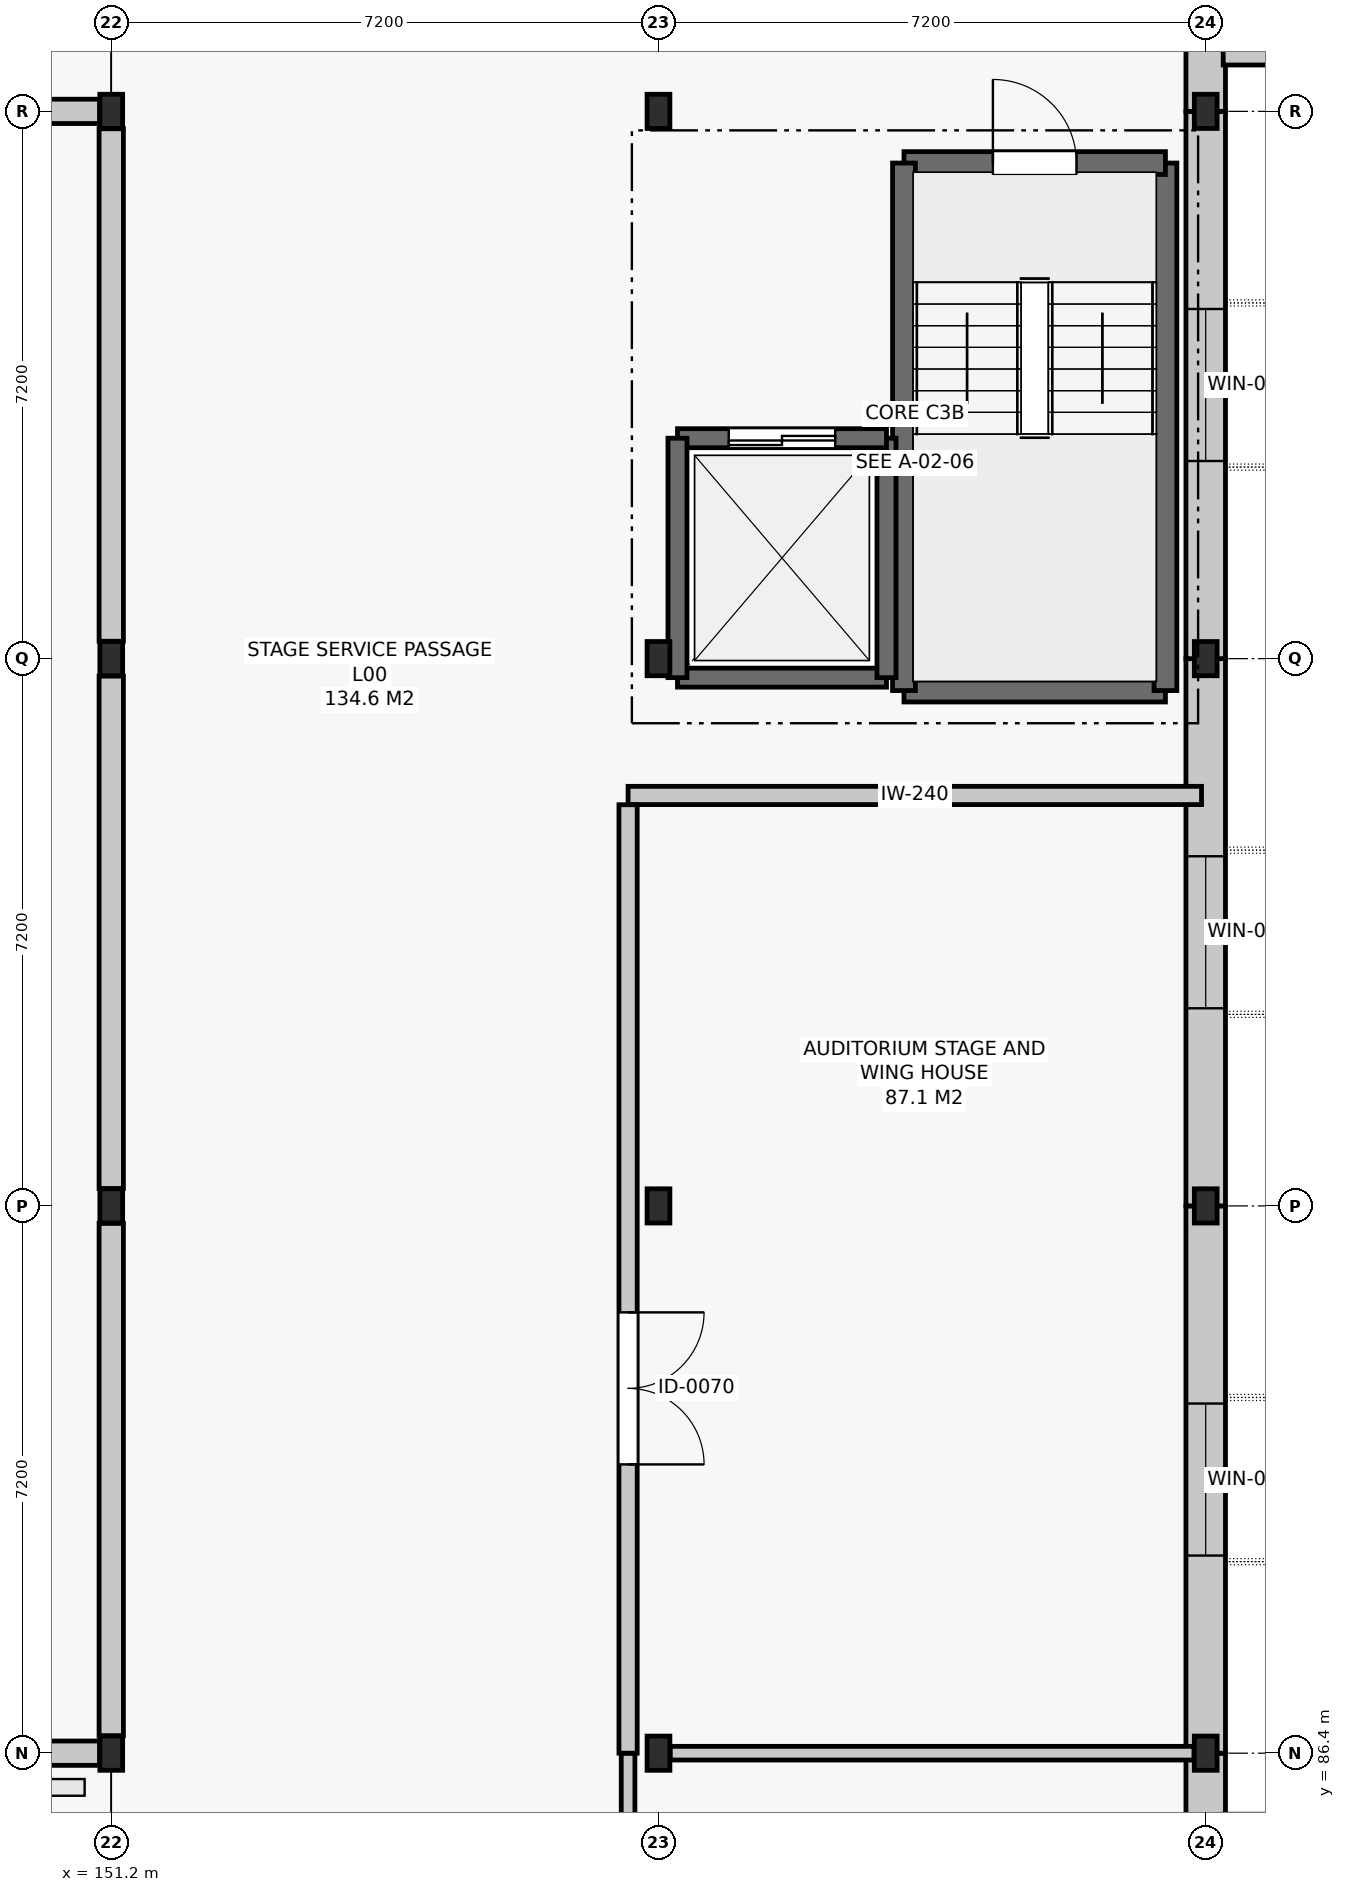
"""IFC4 building model, lengths in metres.
Left out: names, types, materials, properties, quantities, classifications, styles, units other than length and angle.
Written with IfcOpenShell. Run it as: python <this file> out.ifc"""

import sys

from ifc_helpers import new_model, si_unit, direction, frame, frame_2d, origin, origin_2d, place, context, subcontext, project, spatial, rectangle, i_section, extrude, element, fill, save


model = new_model("IFC4")
c1 = context("Model", 3, precision=1e-05, world=origin(), true_north=direction((0.0, 1.0)))
c2 = subcontext(c1, "Body", "Model", "MODEL_VIEW")
j1 = project(units=[si_unit("LENGTHUNIT", "METRE"), si_unit("PLANEANGLEUNIT", "RADIAN")], contexts=[c1])
p1 = place(None, origin())
s1 = spatial("IfcSite", under=j1, at=p1, CompositionType="ELEMENT")
p2 = place(p1, origin())
s2 = spatial("IfcBuilding", under=s1, at=p2, CompositionType="ELEMENT")
p3 = place(p2, origin())
s3 = spatial("IfcBuildingStorey", under=s2, at=p3, CompositionType="ELEMENT", Elevation=0.0)
for number, where, z_axis, x_axis in (
    (1, (151.2, 86.4, 0.0), (0.0, 0.0, 1.0), (1.0, 0.0, 0.0)),
    (2, (151.2, 93.6, 0.0), (0.0, 0.0, 1.0), (1.0, 0.0, 0.0)),
    (3, (151.2, 100.8, 0.0), (0.0, 0.0, 1.0), (1.0, 0.0, 0.0)),
    (4, (151.2, 108.0, 0.0), (0.0, 0.0, 1.0), (1.0, 0.0, 0.0)),
    (5, (158.4, 86.4, 0.0), (0.0, 0.0, 1.0), (1.0, 0.0, 0.0)),
    (6, (158.4, 93.6, 0.0), (0.0, 0.0, 1.0), (1.0, 0.0, 0.0)),
    (7, (158.4, 100.8, 0.0), (0.0, 0.0, 1.0), (1.0, 0.0, 0.0)),
    (8, (158.4, 108.0, 0.0), (0.0, 0.0, 1.0), (1.0, 0.0, 0.0)),
    (9, (165.6, 86.4, 0.0), (0.0, 0.0, 1.0), (1.0, 0.0, 0.0)),
    (10, (165.6, 93.6, 0.0), (0.0, 0.0, 1.0), (1.0, 0.0, 0.0)),
    (11, (165.6, 100.8, 0.0), (0.0, 0.0, 1.0), (1.0, 0.0, 0.0)),
    (12, (165.6, 108.0, 0.0), (0.0, 0.0, 1.0), (1.0, 0.0, 0.0)),
):
    element("IfcColumn", number, at=place(p3, frame(where, z_axis=z_axis, x_axis=x_axis)), inside=s3, PredefinedType="COLUMN", context=c2, shape_type="SweptSolid", body=[
        extrude(i_section(OverallWidth=0.3, OverallDepth=0.45, WebThickness=0.014, FlangeThickness=0.026, FilletRadius=0.027, at=origin_2d()), origin(), (0.0, 0.0, 1.0), 5.4),
    ])
p4 = place(p3, frame((165.6, 79.429, 0.0), z_axis=(0.0, 0.0, 1.0), x_axis=(0.0, 1.0, 0.0)))
e13 = element("IfcWall", 13, at=p4, inside=s3, PredefinedType="SOLIDWALL", context=c2, shape_type="SweptSolid", body=[
    extrude(rectangle(XDim=6.971, YDim=0.52, at=frame_2d((3.485, 0.0))), origin(), (0.0, 0.0, 1.0), 4.4),
])
p5 = place(p4, frame((1.885, 0.0, 0.0)))
e14 = element("IfcOpeningElement", 14, at=p5, cuts=e13, PredefinedType="OPENING", context=c2, shape_type="SweptSolid", body=[
    extrude(rectangle(XDim=3.2, YDim=3.4, at=frame_2d((1.6, 1.7))), frame((0.0, 0.272, 0.0), z_axis=(0.0, -1.0, 0.0), x_axis=(1.0, 0.0, 0.0)), (0.0, 0.0, 1.0), 0.544),
])
p6 = place(p3, frame((165.6, 86.4, 0.0), z_axis=(0.0, 0.0, 1.0), x_axis=(0.0, 1.0, 0.0)))
e15 = element("IfcWall", 15, at=p6, inside=s3, PredefinedType="SOLIDWALL", context=c2, shape_type="SweptSolid", body=[
    extrude(rectangle(XDim=7.2, YDim=0.52, at=frame_2d((3.6, 0.0))), origin(), (0.0, 0.0, 1.0), 4.4),
])
p7 = place(p6, frame((2.6, 0.0, 1.35)))
e16 = element("IfcOpeningElement", 16, at=p7, cuts=e15, PredefinedType="OPENING", context=c2, shape_type="SweptSolid", body=[
    extrude(rectangle(XDim=2.0, YDim=1.5, at=frame_2d((1.0, 0.75))), frame((0.0, 0.272, 0.0), z_axis=(0.0, -1.0, 0.0), x_axis=(1.0, 0.0, 0.0)), (0.0, 0.0, 1.0), 0.544),
])
p8 = place(p3, frame((165.6, 93.6, 0.0), z_axis=(0.0, 0.0, 1.0), x_axis=(0.0, 1.0, 0.0)))
e17 = element("IfcWall", 17, at=p8, inside=s3, PredefinedType="SOLIDWALL", context=c2, shape_type="SweptSolid", body=[
    extrude(rectangle(XDim=7.2, YDim=0.52, at=frame_2d((3.6, 0.0))), origin(), (0.0, 0.0, 1.0), 4.4),
])
p9 = place(p8, frame((2.6, 0.0, 1.35)))
e18 = element("IfcOpeningElement", 18, at=p9, cuts=e17, PredefinedType="OPENING", context=c2, shape_type="SweptSolid", body=[
    extrude(rectangle(XDim=2.0, YDim=1.5, at=frame_2d((1.0, 0.75))), frame((0.0, 0.272, 0.0), z_axis=(0.0, -1.0, 0.0), x_axis=(1.0, 0.0, 0.0)), (0.0, 0.0, 1.0), 0.544),
])
p10 = place(p3, frame((165.6, 100.8, 0.0), z_axis=(0.0, 0.0, 1.0), x_axis=(0.0, 1.0, 0.0)))
e19 = element("IfcWall", 19, at=p10, inside=s3, PredefinedType="SOLIDWALL", context=c2, shape_type="SweptSolid", body=[
    extrude(rectangle(XDim=7.2, YDim=0.52, at=frame_2d((3.6, 0.0))), origin(), (0.0, 0.0, 1.0), 4.4),
])
p11 = place(p10, frame((2.6, 0.0, 1.35)))
e20 = element("IfcOpeningElement", 20, at=p11, cuts=e19, PredefinedType="OPENING", context=c2, shape_type="SweptSolid", body=[
    extrude(rectangle(XDim=2.0, YDim=1.5, at=frame_2d((1.0, 0.75))), frame((0.0, 0.272, 0.0), z_axis=(0.0, -1.0, 0.0), x_axis=(1.0, 0.0, 0.0)), (0.0, 0.0, 1.0), 0.544),
])
p12 = place(p3, frame((165.6, 108.0, 0.0), z_axis=(0.0, 0.0, 1.0), x_axis=(0.0, 1.0, 0.0)))
e21 = element("IfcWall", 21, at=p12, inside=s3, PredefinedType="SOLIDWALL", context=c2, shape_type="SweptSolid", body=[
    extrude(rectangle(XDim=6.971, YDim=0.52, at=frame_2d((3.485, 0.0))), origin(), (0.0, 0.0, 1.0), 4.4),
])
p13 = place(p12, frame((1.5, 0.0, 0.0)))
e22 = element("IfcOpeningElement", 22, at=p13, cuts=e21, PredefinedType="OPENING", context=c2, shape_type="SweptSolid", body=[
    extrude(rectangle(XDim=1.8, YDim=2.2, at=frame_2d((0.9, 1.1))), frame((0.0, 0.272, 0.0), z_axis=(0.0, -1.0, 0.0), x_axis=(1.0, 0.0, 0.0)), (0.0, 0.0, 1.0), 0.544),
])
p14 = place(p3, frame((161.63, 100.38, 0.0), z_axis=(0.0, 0.0, 1.0), x_axis=(1.0, 0.0, 0.0)))
e23 = element("IfcWall", 23, at=p14, inside=s3, PredefinedType="SHEAR", context=c2, shape_type="SweptSolid", body=[
    extrude(rectangle(XDim=3.44, YDim=0.3, at=frame_2d((1.72, 0.0))), origin(), (0.0, 0.0, 1.0), 5.12),
])
p15 = place(p3, frame((165.07, 100.38, 0.0), z_axis=(0.0, 0.0, 1.0), x_axis=(0.0, 1.0, 0.0)))
e24 = element("IfcWall", 24, at=p15, inside=s3, PredefinedType="SHEAR", context=c2, shape_type="SweptSolid", body=[
    extrude(rectangle(XDim=6.94, YDim=0.3, at=frame_2d((3.47, 0.0))), origin(), (0.0, 0.0, 1.0), 5.12),
])
p16 = place(p3, frame((165.07, 107.32, 0.0), z_axis=(0.0, 0.0, 1.0), x_axis=(-1.0, 0.0, 0.0)))
e25 = element("IfcWall", 25, at=p16, inside=s3, PredefinedType="SHEAR", context=c2, shape_type="SweptSolid", body=[
    extrude(rectangle(XDim=3.44, YDim=0.3, at=frame_2d((1.72, 0.0))), origin(), (0.0, 0.0, 1.0), 5.12),
])
p17 = place(p16, frame((1.17, 0.0, 0.0)))
e26 = element("IfcOpeningElement", 26, at=p17, cuts=e25, PredefinedType="OPENING", context=c2, shape_type="SweptSolid", body=[
    extrude(rectangle(XDim=1.1, YDim=2.15, at=frame_2d((0.55, 1.075))), frame((0.0, 0.162, 0.0), z_axis=(0.0, -1.0, 0.0), x_axis=(1.0, 0.0, 0.0)), (0.0, 0.0, 1.0), 0.324),
])
p18 = place(p3, frame((161.63, 107.32, 0.0), z_axis=(0.0, 0.0, 1.0), x_axis=(0.0, -1.0, 0.0)))
e27 = element("IfcWall", 27, at=p18, inside=s3, PredefinedType="SHEAR", context=c2, shape_type="SweptSolid", body=[
    extrude(rectangle(XDim=6.94, YDim=0.3, at=frame_2d((3.47, 0.0))), origin(), (0.0, 0.0, 1.0), 5.12),
])
p19 = place(p3, frame((158.65, 100.55, 0.0), z_axis=(0.0, 0.0, 1.0), x_axis=(1.0, 0.0, 0.0)))
e28 = element("IfcWall", 28, at=p19, inside=s3, PredefinedType="SHEAR", context=c2, shape_type="SweptSolid", body=[
    extrude(rectangle(XDim=2.75, YDim=0.25, at=frame_2d((1.375, 0.0))), origin(), (0.0, 0.0, 1.0), 5.12),
])
p20 = place(p3, frame((161.4, 100.55, 0.0), z_axis=(0.0, 0.0, 1.0), x_axis=(0.0, 1.0, 0.0)))
e29 = element("IfcWall", 29, at=p20, inside=s3, PredefinedType="SHEAR", context=c2, shape_type="SweptSolid", body=[
    extrude(rectangle(XDim=3.15, YDim=0.25, at=frame_2d((1.575, 0.0))), origin(), (0.0, 0.0, 1.0), 5.12),
])
p21 = place(p3, frame((161.4, 103.7, 0.0), z_axis=(0.0, 0.0, 1.0), x_axis=(-1.0, 0.0, 0.0)))
e30 = element("IfcWall", 30, at=p21, inside=s3, PredefinedType="SHEAR", context=c2, shape_type="SweptSolid", body=[
    extrude(rectangle(XDim=2.75, YDim=0.25, at=frame_2d((1.375, 0.0))), origin(), (0.0, 0.0, 1.0), 5.12),
])
p22 = place(p21, frame((0.675, 0.0, 0.0)))
e31 = element("IfcOpeningElement", 31, at=p22, cuts=e30, PredefinedType="OPENING", context=c2, shape_type="SweptSolid", body=[
    extrude(rectangle(XDim=1.4, YDim=2.2, at=frame_2d((0.7, 1.1))), frame((0.0, 0.137, 0.0), z_axis=(0.0, -1.0, 0.0), x_axis=(1.0, 0.0, 0.0)), (0.0, 0.0, 1.0), 0.274),
])
p23 = place(p3, frame((158.65, 103.7, 0.0), z_axis=(0.0, 0.0, 1.0), x_axis=(0.0, -1.0, 0.0)))
e32 = element("IfcWall", 32, at=p23, inside=s3, PredefinedType="SHEAR", context=c2, shape_type="SweptSolid", body=[
    extrude(rectangle(XDim=3.15, YDim=0.25, at=frame_2d((1.575, 0.0))), origin(), (0.0, 0.0, 1.0), 5.12),
])
for number, where, z_axis, x_axis in (
    (33, (144.154, 86.4, 0.0), (0.0, 0.0, 1.0), (1.0, 0.0, 0.0)),
    (34, (144.154, 108.0, 0.0), (0.0, 0.0, 1.0), (1.0, 0.0, 0.0)),
):
    element("IfcWall", number, at=place(p3, frame(where, z_axis=z_axis, x_axis=x_axis)), inside=s3, PredefinedType="SOLIDWALL", context=c2, shape_type="SweptSolid", body=[
        extrude(rectangle(XDim=6.892, YDim=0.32, at=frame_2d((3.446, 0.0))), origin(), (0.0, 0.0, 1.0), 5.105),
    ])
p24 = place(p3, frame((158.554, 86.4, 0.0), z_axis=(0.0, 0.0, 1.0), x_axis=(1.0, 0.0, 0.0)))
e35 = element("IfcWall", 35, at=p24, inside=s3, PredefinedType="PARTITIONING", context=c2, shape_type="SweptSolid", body=[
    extrude(rectangle(XDim=6.892, YDim=0.18, at=frame_2d((3.446, 0.0))), origin(), (0.0, 0.0, 1.0), 4.615),
])
p25 = place(p3, frame((158.0, 99.0, 0.0), z_axis=(0.0, 0.0, 1.0), x_axis=(1.0, 0.0, 0.0)))
e36 = element("IfcWall", 36, at=p25, inside=s3, PredefinedType="SOLIDWALL", context=c2, shape_type="SweptSolid", body=[
    extrude(rectangle(XDim=7.545, YDim=0.24, at=frame_2d((3.772, 0.0))), origin(), (0.0, 0.0, 1.0), 4.405),
])
p26 = place(p3, frame((151.2, 86.629, 0.0), z_axis=(0.0, 0.0, 1.0), x_axis=(0.0, 1.0, 0.0)))
e37 = element("IfcWall", 37, at=p26, inside=s3, PredefinedType="SOLIDWALL", context=c2, shape_type="SweptSolid", body=[
    extrude(rectangle(XDim=6.742, YDim=0.32, at=frame_2d((3.371, 0.0))), origin(), (0.0, 0.0, 1.0), 5.105),
])
for number, where, z_axis, x_axis in (
    (38, (151.2, 93.829, 0.0), (0.0, 0.0, 1.0), (0.0, 1.0, 0.0)),
    (39, (151.2, 101.029, 0.0), (0.0, 0.0, 1.0), (0.0, 1.0, 0.0)),
):
    element("IfcWall", number, at=place(p3, frame(where, z_axis=z_axis, x_axis=x_axis)), inside=s3, PredefinedType="SOLIDWALL", context=c2, shape_type="SweptSolid", body=[
        extrude(rectangle(XDim=6.742, YDim=0.32, at=frame_2d((3.371, 0.0))), origin(), (0.0, 0.0, 1.0), 5.105),
    ])
p27 = place(p3, frame((158.0, 79.255, 0.0), z_axis=(0.0, 0.0, 1.0), x_axis=(0.0, 1.0, 0.0)))
e40 = element("IfcWall", 40, at=p27, inside=s3, PredefinedType="PARTITIONING", context=c2, shape_type="SweptSolid", body=[
    extrude(rectangle(XDim=7.145, YDim=0.18, at=frame_2d((3.573, 0.0))), origin(), (0.0, 0.0, 1.0), 4.555),
])
p28 = place(p27, frame((2.823, 0.0, 0.0)))
e41 = element("IfcOpeningElement", 41, at=p28, cuts=e40, PredefinedType="OPENING", context=c2, shape_type="SweptSolid", body=[
    extrude(rectangle(XDim=1.5, YDim=2.2, at=frame_2d((0.75, 1.1))), frame((0.0, 0.102, 0.0), z_axis=(0.0, -1.0, 0.0), x_axis=(1.0, 0.0, 0.0)), (0.0, 0.0, 1.0), 0.204),
])
p29 = place(p3, frame((158.0, 86.4, 0.0), z_axis=(0.0, 0.0, 1.0), x_axis=(0.0, 1.0, 0.0)))
e42 = element("IfcWall", 42, at=p29, inside=s3, PredefinedType="SOLIDWALL", context=c2, shape_type="SweptSolid", body=[
    extrude(rectangle(XDim=12.478, YDim=0.24, at=frame_2d((6.239, 0.0))), origin(), (0.0, 0.0, 1.0), 4.615),
])
p30 = place(p29, frame((3.799, 0.0, 0.0)))
e43 = element("IfcOpeningElement", 43, at=p30, cuts=e42, PredefinedType="OPENING", context=c2, shape_type="SweptSolid", body=[
    extrude(rectangle(XDim=2.0, YDim=2.4, at=frame_2d((1.0, 1.2))), frame((0.0, 0.132, 0.0), z_axis=(0.0, -1.0, 0.0), x_axis=(1.0, 0.0, 0.0)), (0.0, 0.0, 1.0), 0.264),
])
p31 = place(p7, origin())
e44 = element("IfcWindow", 44, at=p31, inside=s3, PartitioningType="SINGLE_PANEL", PredefinedType="WINDOW", context=c2, shape_type="SweptSolid", body=[
    extrude(rectangle(XDim=2.0, YDim=1.5, at=frame_2d((1.0, 0.75))), frame((0.0, 0.03, 0.0), z_axis=(0.0, -1.0, 0.0), x_axis=(1.0, 0.0, 0.0)), (0.0, 0.0, 1.0), 0.06),
])
fill(e16, e44)
p32 = place(p9, origin())
e45 = element("IfcWindow", 45, at=p32, inside=s3, PartitioningType="SINGLE_PANEL", PredefinedType="WINDOW", context=c2, shape_type="SweptSolid", body=[
    extrude(rectangle(XDim=2.0, YDim=1.5, at=frame_2d((1.0, 0.75))), frame((0.0, 0.03, 0.0), z_axis=(0.0, -1.0, 0.0), x_axis=(1.0, 0.0, 0.0)), (0.0, 0.0, 1.0), 0.06),
])
fill(e18, e45)
p33 = place(p11, origin())
e46 = element("IfcWindow", 46, at=p33, inside=s3, PartitioningType="SINGLE_PANEL", PredefinedType="WINDOW", context=c2, shape_type="SweptSolid", body=[
    extrude(rectangle(XDim=2.0, YDim=1.5, at=frame_2d((1.0, 0.75))), frame((0.0, 0.03, 0.0), z_axis=(0.0, -1.0, 0.0), x_axis=(1.0, 0.0, 0.0)), (0.0, 0.0, 1.0), 0.06),
])
fill(e20, e46)
p34 = place(p17, frame((1.1, 0.0, 0.0), z_axis=(0.0, 0.0, 1.0), x_axis=(-1.0, 0.0, 0.0)))
e47 = element("IfcDoor", 47, at=p34, inside=s3, OperationType="SINGLE_SWING_LEFT", PredefinedType="DOOR", context=c2, shape_type="SweptSolid", body=[
    extrude(rectangle(XDim=1.1, YDim=2.15, at=frame_2d((0.55, 1.075))), frame((0.0, 0.025, 0.0), z_axis=(0.0, -1.0, 0.0), x_axis=(1.0, 0.0, 0.0)), (0.0, 0.0, 1.0), 0.05),
])
fill(e26, e47)
p35 = place(p22, origin())
e48 = element("IfcDoor", 48, at=p35, inside=s3, OperationType="DOUBLE_DOOR_SLIDING", PredefinedType="DOOR", context=c2, shape_type="SweptSolid", body=[
    extrude(rectangle(XDim=1.4, YDim=2.2, at=frame_2d((0.7, 1.1))), frame((0.0, 0.025, 0.0), z_axis=(0.0, -1.0, 0.0), x_axis=(1.0, 0.0, 0.0)), (0.0, 0.0, 1.0), 0.05),
])
fill(e31, e48)
p36 = place(p30, frame((2.0, 0.0, 0.0), z_axis=(0.0, 0.0, 1.0), x_axis=(-1.0, 0.0, 0.0)))
e49 = element("IfcDoor", 49, at=p36, inside=s3, OperationType="DOUBLE_DOOR_SINGLE_SWING", PredefinedType="DOOR", context=c2, shape_type="SweptSolid", body=[
    extrude(rectangle(XDim=2.0, YDim=2.4, at=frame_2d((1.0, 1.2))), frame((0.0, 0.025, 0.0), z_axis=(0.0, -1.0, 0.0), x_axis=(1.0, 0.0, 0.0)), (0.0, 0.0, 1.0), 0.05),
])
fill(e43, e49)
save(model, sys.argv[1])
